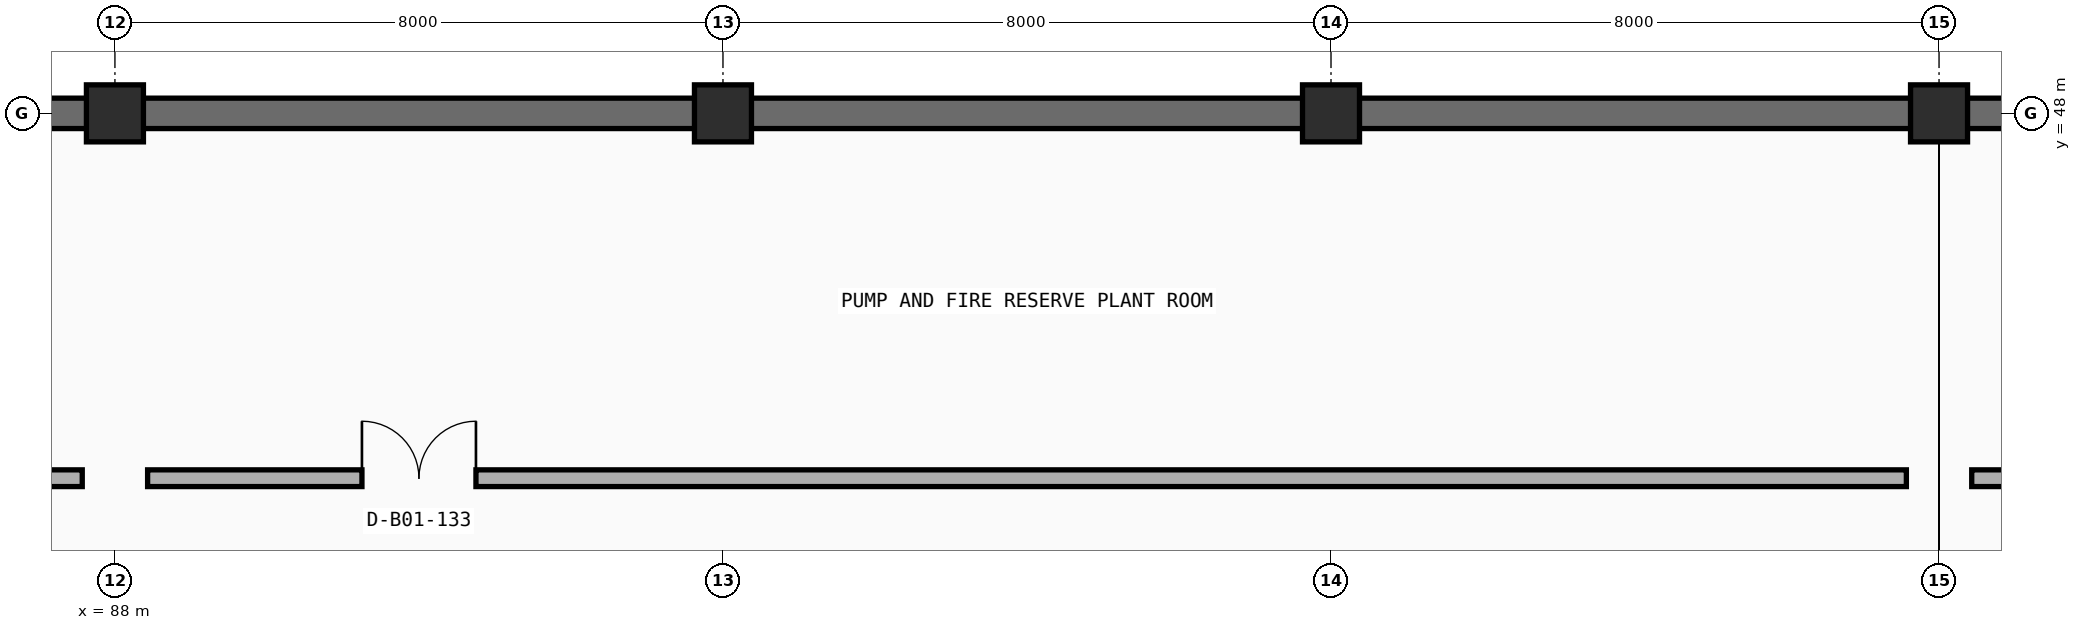
"""IFC4 building model, lengths in metres.
Left out: names, types, materials, properties, quantities, classifications, styles, units other than length and angle.
Written with IfcOpenShell. Run it as: python <this file> out.ifc"""

import sys

from ifc_helpers import new_model, si_unit, direction, frame, frame_2d, origin, origin_2d, place, context, subcontext, project, spatial, rectangle, extrude, element, fill, save


model = new_model("IFC4")
c1 = context("Model", 3, precision=1e-05, world=origin(), true_north=direction((0.0, 1.0)))
c2 = subcontext(c1, "Body", "Model", "MODEL_VIEW")
j1 = project(units=[si_unit("LENGTHUNIT", "METRE"), si_unit("PLANEANGLEUNIT", "RADIAN")], contexts=[c1])
p1 = place(None, origin())
s1 = spatial("IfcSite", under=j1, at=p1, CompositionType="ELEMENT")
p2 = place(p1, origin())
s2 = spatial("IfcBuilding", under=s1, at=p2, CompositionType="ELEMENT")
p3 = place(p2, frame((0.0, 0.0, -4.5)))
s3 = spatial("IfcBuildingStorey", under=s2, at=p3, CompositionType="ELEMENT", Elevation=-4.5)
for number, where, z_axis, x_axis in (
    (1, (88.0, 48.0, -0.405), (0.0, 0.0, 1.0), (1.0, 0.0, 0.0)),
    (2, (96.0, 48.0, -0.405), (0.0, 0.0, 1.0), (1.0, 0.0, 0.0)),
    (3, (104.0, 48.0, -0.405), (0.0, 0.0, 1.0), (1.0, 0.0, 0.0)),
    (4, (112.0, 48.0, -0.405), (0.0, 0.0, 1.0), (1.0, 0.0, 0.0)),
):
    element("IfcColumn", number, at=place(p3, frame(where, z_axis=z_axis, x_axis=x_axis)), inside=s3, PredefinedType="COLUMN", context=c2, shape_type="SweptSolid", body=[
        extrude(rectangle(XDim=0.75, YDim=0.75, at=origin_2d()), origin(), (0.0, 0.0, 1.0), 4.905),
    ])
for number, where, z_axis, x_axis in (
    (5, (80.35, 48.0, 0.0), (0.0, 0.0, 1.0), (1.0, 0.0, 0.0)),
    (6, (88.35, 48.0, 0.0), (0.0, 0.0, 1.0), (1.0, 0.0, 0.0)),
    (7, (96.35, 48.0, 0.0), (0.0, 0.0, 1.0), (1.0, 0.0, 0.0)),
    (8, (104.35, 48.0, 0.0), (0.0, 0.0, 1.0), (1.0, 0.0, 0.0)),
    (9, (112.35, 48.0, 0.0), (0.0, 0.0, 1.0), (1.0, 0.0, 0.0)),
):
    element("IfcWall", number, at=place(p3, frame(where, z_axis=z_axis, x_axis=x_axis)), inside=s3, PredefinedType="USERDEFINED", context=c2, shape_type="SweptSolid", body=[
        extrude(rectangle(XDim=7.3, YDim=0.4, at=frame_2d((3.65, 0.0))), origin(), (0.0, 0.0, 1.0), 4.095),
    ])
p4 = place(p3, frame((56.43, 43.2, 0.0), z_axis=(0.0, 0.0, 1.0), x_axis=(1.0, 0.0, 0.0)))
e10 = element("IfcWall", 10, at=p4, inside=s3, PredefinedType="PARTITIONING", context=c2, shape_type="SweptSolid", body=[
    extrude(rectangle(XDim=31.14, YDim=0.22, at=frame_2d((15.57, 0.0))), origin(), (0.0, 0.0, 1.0), 3.6),
])
p5 = place(p4, frame((2.82, 0.0, 0.0)))
e11 = element("IfcOpeningElement", 11, at=p5, cuts=e10, PredefinedType="OPENING", context=c2, shape_type="SweptSolid", body=[
    extrude(rectangle(XDim=1.5, YDim=2.2, at=frame_2d((0.75, 1.1))), frame((0.0, 0.12, 0.0), z_axis=(0.0, -1.0, 0.0), x_axis=(1.0, 0.0, 0.0)), (0.0, 0.0, 1.0), 0.24),
])
p6 = place(p3, frame((88.43, 43.2, 0.0), z_axis=(0.0, 0.0, 1.0), x_axis=(1.0, 0.0, 0.0)))
e12 = element("IfcWall", 12, at=p6, inside=s3, PredefinedType="PARTITIONING", context=c2, shape_type="SweptSolid", body=[
    extrude(rectangle(XDim=23.14, YDim=0.22, at=frame_2d((11.57, 0.0))), origin(), (0.0, 0.0, 1.0), 3.6),
])
p7 = place(p6, frame((2.82, 0.0, 0.0)))
e13 = element("IfcOpeningElement", 13, at=p7, cuts=e12, PredefinedType="OPENING", context=c2, shape_type="SweptSolid", body=[
    extrude(rectangle(XDim=1.5, YDim=2.2, at=frame_2d((0.75, 1.1))), frame((0.0, 0.12, 0.0), z_axis=(0.0, -1.0, 0.0), x_axis=(1.0, 0.0, 0.0)), (0.0, 0.0, 1.0), 0.24),
])
p8 = place(p3, frame((112.43, 43.2, 0.0), z_axis=(0.0, 0.0, 1.0), x_axis=(1.0, 0.0, 0.0)))
e14 = element("IfcWall", 14, at=p8, inside=s3, PredefinedType="PARTITIONING", context=c2, shape_type="SweptSolid", body=[
    extrude(rectangle(XDim=31.14, YDim=0.22, at=frame_2d((15.57, 0.0))), origin(), (0.0, 0.0, 1.0), 3.6),
])
p9 = place(p8, frame((2.82, 0.0, 0.0)))
e15 = element("IfcOpeningElement", 15, at=p9, cuts=e14, PredefinedType="OPENING", context=c2, shape_type="SweptSolid", body=[
    extrude(rectangle(XDim=1.5, YDim=2.2, at=frame_2d((0.75, 1.1))), frame((0.0, 0.12, 0.0), z_axis=(0.0, -1.0, 0.0), x_axis=(1.0, 0.0, 0.0)), (0.0, 0.0, 1.0), 0.24),
])
p10 = place(p7, origin())
e16 = element("IfcDoor", 16, at=p10, inside=s3, OperationType="DOUBLE_DOOR_SINGLE_SWING", PredefinedType="DOOR", context=c2, shape_type="SweptSolid", body=[
    extrude(rectangle(XDim=1.5, YDim=2.2, at=frame_2d((0.75, 1.1))), frame((0.0, 0.025, 0.0), z_axis=(0.0, -1.0, 0.0), x_axis=(1.0, 0.0, 0.0)), (0.0, 0.0, 1.0), 0.05),
])
fill(e13, e16)
save(model, sys.argv[1])
